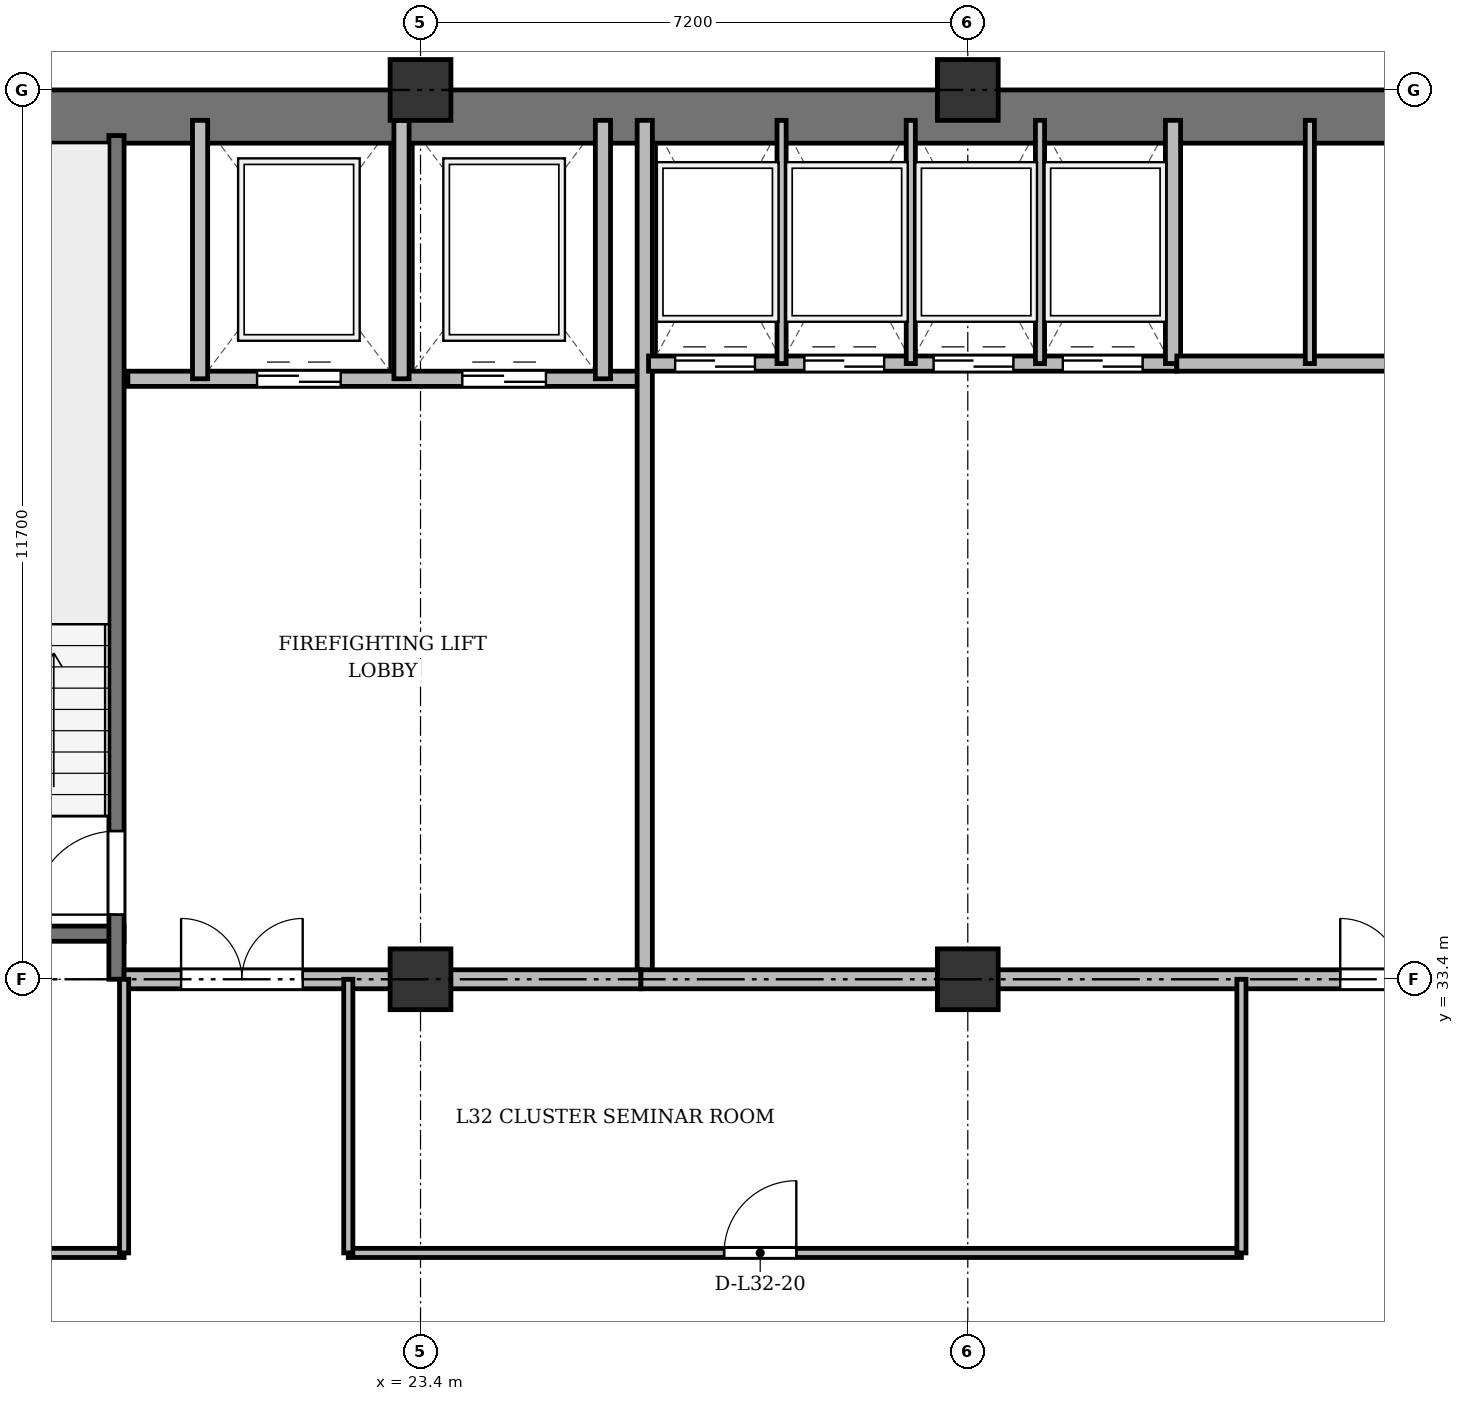
"""IFC4 building model, lengths in metres.
Left out: names, types, materials, properties, quantities, classifications, styles, units other than length and angle.
Written with IfcOpenShell. Run it as: python <this file> out.ifc"""

import sys

from ifc_helpers import new_model, si_unit, direction, frame, frame_2d, origin, origin_2d, place, context, subcontext, project, spatial, rectangle, extrude, source, transform, mapped, element, fill, save


model = new_model("IFC4")
c1 = context("Model", 3, precision=1e-05, world=origin(), true_north=direction((0.0, 1.0)))
c2 = subcontext(c1, "Body", "Model", "MODEL_VIEW")
j1 = project(units=[si_unit("LENGTHUNIT", "METRE"), si_unit("PLANEANGLEUNIT", "RADIAN")], contexts=[c1])
p1 = place(None, origin())
s1 = spatial("IfcSite", under=j1, at=p1, CompositionType="ELEMENT")
p2 = place(p1, origin())
s2 = spatial("IfcBuilding", under=s1, at=p2, CompositionType="ELEMENT")
p3 = place(p2, frame((0.0, 0.0, 124.9)))
s3 = spatial("IfcBuildingStorey", under=s2, at=p3, CompositionType="ELEMENT", Elevation=124.9)
m1 = source(origin(), c2, "Body", "SweptSolid", [
    extrude(rectangle(XDim=0.8, YDim=0.8, at=origin_2d()), origin(), (0.0, 0.0, 1.0), 3.6),
])
for number, where, z_axis, x_axis in (
    (1, (23.4, 33.4, 0.0), (0.0, 0.0, 1.0), (1.0, 0.0, 0.0)),
    (2, (23.4, 45.1, 0.0), (0.0, 0.0, 1.0), (1.0, 0.0, 0.0)),
    (3, (30.6, 33.4, 0.0), (0.0, 0.0, 1.0), (1.0, 0.0, 0.0)),
    (4, (30.6, 45.1, 0.0), (0.0, 0.0, 1.0), (1.0, 0.0, 0.0)),
):
    element("IfcColumn", number, at=place(p3, frame(where, z_axis=z_axis, x_axis=x_axis)), inside=s3, PredefinedType="COLUMN", context=c2, shape_type="MappedRepresentation", body=[
        mapped(m1, transform((0.0, 0.0, 0.0), x_axis=(1.0, 0.0, 0.0), y_axis=(0.0, 1.0, 0.0), z_axis=(0.0, 0.0, 1.0), scale=1.0)),
    ])
p4 = place(p3, frame((15.5, 44.75, 0.0), z_axis=(0.0, 0.0, 1.0), x_axis=(1.0, 0.0, 0.0)))
e5 = element("IfcWall", 5, at=p4, inside=s3, PredefinedType="SHEAR", context=c2, shape_type="SweptSolid", body=[
    extrude(rectangle(XDim=43.4, YDim=0.7, at=frame_2d((21.7, 0.0))), origin(), (0.0, 0.0, 1.0), 3.34),
])
p5 = place(p3, frame((16.1, 34.0, 0.0), z_axis=(0.0, 0.0, 1.0), x_axis=(1.0, 0.0, 0.0)))
e6 = element("IfcWall", 6, at=p5, inside=s3, PredefinedType="SHEAR", context=c2, shape_type="SweptSolid", body=[
    extrude(rectangle(XDim=3.4, YDim=0.2, at=frame_2d((1.7, 0.0))), origin(), (0.0, 0.0, 1.0), 3.34),
])
p6 = place(p3, frame((19.4, 33.4, 0.0), z_axis=(0.0, 0.0, 1.0), x_axis=(0.0, 1.0, 0.0)))
e7 = element("IfcWall", 7, at=p6, inside=s3, PredefinedType="SHEAR", context=c2, shape_type="SweptSolid", body=[
    extrude(rectangle(XDim=11.1, YDim=0.2, at=frame_2d((5.55, 0.0))), origin(), (0.0, 0.0, 1.0), 3.34),
])
p7 = place(p6, frame((0.85, 0.0, 0.0)))
e8 = element("IfcOpeningElement", 8, at=p7, cuts=e7, PredefinedType="OPENING", context=c2, shape_type="SweptSolid", body=[
    extrude(rectangle(XDim=1.1, YDim=2.15, at=frame_2d((0.55, 1.075))), frame((0.0, 0.11, 0.0), z_axis=(0.0, -1.0, 0.0), x_axis=(1.0, 0.0, 0.0)), (0.0, 0.0, 1.0), 0.22),
])
p8 = place(p3, frame((19.55, 41.3, 0.0), z_axis=(0.0, 0.0, 1.0), x_axis=(1.0, 0.0, 0.0)))
e9 = element("IfcWall", 9, at=p8, inside=s3, PredefinedType="SOLIDWALL", context=c2, shape_type="SweptSolid", body=[
    extrude(rectangle(XDim=6.75, YDim=0.2, at=frame_2d((3.375, 0.0))), origin(), (0.0, 0.0, 1.0), 3.34),
])
p9 = place(p8, frame((1.7, 0.0, 0.0)))
e10 = element("IfcOpeningElement", 10, at=p9, cuts=e9, PredefinedType="OPENING", context=c2, shape_type="SweptSolid", body=[
    extrude(rectangle(XDim=1.1, YDim=2.15, at=frame_2d((0.55, 1.075))), frame((0.0, 0.11, 0.0), z_axis=(0.0, -1.0, 0.0), x_axis=(1.0, 0.0, 0.0)), (0.0, 0.0, 1.0), 0.22),
])
p10 = place(p8, frame((4.4, 0.0, 0.0)))
e11 = element("IfcOpeningElement", 11, at=p10, cuts=e9, PredefinedType="OPENING", context=c2, shape_type="SweptSolid", body=[
    extrude(rectangle(XDim=1.1, YDim=2.15, at=frame_2d((0.55, 1.075))), frame((0.0, 0.11, 0.0), z_axis=(0.0, -1.0, 0.0), x_axis=(1.0, 0.0, 0.0)), (0.0, 0.0, 1.0), 0.22),
])
for number, where, z_axis, x_axis in (
    (12, (20.5, 41.3, 0.0), (0.0, 0.0, 1.0), (0.0, 1.0, 0.0)),
    (13, (23.15, 41.3, 0.0), (0.0, 0.0, 1.0), (0.0, 1.0, 0.0)),
    (14, (25.8, 41.3, 0.0), (0.0, 0.0, 1.0), (0.0, 1.0, 0.0)),
):
    element("IfcWall", number, at=place(p3, frame(where, z_axis=z_axis, x_axis=x_axis)), inside=s3, PredefinedType="SOLIDWALL", context=c2, shape_type="SweptSolid", body=[
        extrude(rectangle(XDim=3.4, YDim=0.2, at=frame_2d((1.7, 0.0))), origin(), (0.0, 0.0, 1.0), 3.34),
    ])
p11 = place(p3, frame((26.35, 33.4, 0.0), z_axis=(0.0, 0.0, 1.0), x_axis=(0.0, 1.0, 0.0)))
e15 = element("IfcWall", 15, at=p11, inside=s3, PredefinedType="SOLIDWALL", context=c2, shape_type="SweptSolid", body=[
    extrude(rectangle(XDim=11.3, YDim=0.2, at=frame_2d((5.65, 0.0))), origin(), (0.0, 0.0, 1.0), 2.752),
])
p12 = place(p3, frame((19.5, 33.4, 0.0), z_axis=(0.0, 0.0, 1.0), x_axis=(1.0, 0.0, 0.0)))
e16 = element("IfcWall", 16, at=p12, inside=s3, PredefinedType="PARTITIONING", context=c2, shape_type="SweptSolid", body=[
    extrude(rectangle(XDim=6.8, YDim=0.25, at=frame_2d((3.4, 0.0))), origin(), (0.0, 0.0, 1.0), 2.752),
])
p13 = place(p12, frame((0.75, 0.0, 0.0)))
e17 = element("IfcOpeningElement", 17, at=p13, cuts=e16, PredefinedType="OPENING", context=c2, shape_type="SweptSolid", body=[
    extrude(rectangle(XDim=1.6, YDim=2.2, at=frame_2d((0.8, 1.1))), frame((0.0, 0.135, 0.0), z_axis=(0.0, -1.0, 0.0), x_axis=(1.0, 0.0, 0.0)), (0.0, 0.0, 1.0), 0.27),
])
p14 = place(p3, frame((26.4, 41.5, 0.0), z_axis=(0.0, 0.0, 1.0), x_axis=(1.0, 0.0, 0.0)))
e18 = element("IfcWall", 18, at=p14, inside=s3, PredefinedType="SOLIDWALL", context=c2, shape_type="SweptSolid", body=[
    extrude(rectangle(XDim=6.95, YDim=0.2, at=frame_2d((3.475, 0.0))), origin(), (0.0, 0.0, 1.0), 3.34),
])
p15 = place(p14, frame((0.35, 0.0, 0.0)))
e19 = element("IfcOpeningElement", 19, at=p15, cuts=e18, PredefinedType="OPENING", context=c2, shape_type="SweptSolid", body=[
    extrude(rectangle(XDim=1.05, YDim=2.15, at=frame_2d((0.525, 1.075))), frame((0.0, 0.11, 0.0), z_axis=(0.0, -1.0, 0.0), x_axis=(1.0, 0.0, 0.0)), (0.0, 0.0, 1.0), 0.22),
])
p16 = place(p14, frame((2.05, 0.0, 0.0)))
e20 = element("IfcOpeningElement", 20, at=p16, cuts=e18, PredefinedType="OPENING", context=c2, shape_type="SweptSolid", body=[
    extrude(rectangle(XDim=1.05, YDim=2.15, at=frame_2d((0.525, 1.075))), frame((0.0, 0.11, 0.0), z_axis=(0.0, -1.0, 0.0), x_axis=(1.0, 0.0, 0.0)), (0.0, 0.0, 1.0), 0.22),
])
p17 = place(p14, frame((3.75, 0.0, 0.0)))
e21 = element("IfcOpeningElement", 21, at=p17, cuts=e18, PredefinedType="OPENING", context=c2, shape_type="SweptSolid", body=[
    extrude(rectangle(XDim=1.05, YDim=2.15, at=frame_2d((0.525, 1.075))), frame((0.0, 0.11, 0.0), z_axis=(0.0, -1.0, 0.0), x_axis=(1.0, 0.0, 0.0)), (0.0, 0.0, 1.0), 0.22),
])
p18 = place(p14, frame((5.45, 0.0, 0.0)))
e22 = element("IfcOpeningElement", 22, at=p18, cuts=e18, PredefinedType="OPENING", context=c2, shape_type="SweptSolid", body=[
    extrude(rectangle(XDim=1.05, YDim=2.15, at=frame_2d((0.525, 1.075))), frame((0.0, 0.11, 0.0), z_axis=(0.0, -1.0, 0.0), x_axis=(1.0, 0.0, 0.0)), (0.0, 0.0, 1.0), 0.22),
])
p19 = place(p3, frame((33.3, 41.5, 0.0), z_axis=(0.0, 0.0, 1.0), x_axis=(0.0, 1.0, 0.0)))
e23 = element("IfcWall", 23, at=p19, inside=s3, PredefinedType="SOLIDWALL", context=c2, shape_type="SweptSolid", body=[
    extrude(rectangle(XDim=3.2, YDim=0.2, at=frame_2d((1.6, 0.0))), origin(), (0.0, 0.0, 1.0), 3.34),
])
for number, where, z_axis, x_axis in (
    (24, (28.15, 41.5, 0.0), (0.0, 0.0, 1.0), (0.0, 1.0, 0.0)),
    (25, (29.85, 41.5, 0.0), (0.0, 0.0, 1.0), (0.0, 1.0, 0.0)),
    (26, (31.55, 41.5, 0.0), (0.0, 0.0, 1.0), (0.0, 1.0, 0.0)),
):
    element("IfcWall", number, at=place(p3, frame(where, z_axis=z_axis, x_axis=x_axis)), inside=s3, PredefinedType="PARTITIONING", context=c2, shape_type="SweptSolid", body=[
        extrude(rectangle(XDim=3.2, YDim=0.12, at=frame_2d((1.6, 0.0))), origin(), (0.0, 0.0, 1.0), 3.34),
    ])
p20 = place(p3, frame((33.35, 41.5, 0.0), z_axis=(0.0, 0.0, 1.0), x_axis=(1.0, 0.0, 0.0)))
e27 = element("IfcWall", 27, at=p20, inside=s3, PredefinedType="SOLIDWALL", context=c2, shape_type="SweptSolid", body=[
    extrude(rectangle(XDim=6.9, YDim=0.2, at=frame_2d((3.45, 0.0))), origin(), (0.0, 0.0, 1.0), 3.34),
])
p21 = place(p3, frame((35.1, 41.5, 0.0), z_axis=(0.0, 0.0, 1.0), x_axis=(0.0, 1.0, 0.0)))
e28 = element("IfcWall", 28, at=p21, inside=s3, PredefinedType="PARTITIONING", context=c2, shape_type="SweptSolid", body=[
    extrude(rectangle(XDim=3.2, YDim=0.12, at=frame_2d((1.6, 0.0))), origin(), (0.0, 0.0, 1.0), 3.34),
])
p22 = place(p3, frame((26.3, 33.4, 0.0), z_axis=(0.0, 0.0, 1.0), x_axis=(1.0, 0.0, 0.0)))
e29 = element("IfcWall", 29, at=p22, inside=s3, PredefinedType="PARTITIONING", context=c2, shape_type="SweptSolid", body=[
    extrude(rectangle(XDim=20.85, YDim=0.25, at=frame_2d((10.425, 0.0))), origin(), (0.0, 0.0, 1.0), 2.752),
])
p23 = place(p22, frame((9.2, 0.0, 0.0)))
e30 = element("IfcOpeningElement", 30, at=p23, cuts=e29, PredefinedType="OPENING", context=c2, shape_type="SweptSolid", body=[
    extrude(rectangle(XDim=1.6, YDim=2.2, at=frame_2d((0.8, 1.1))), frame((0.0, 0.135, 0.0), z_axis=(0.0, -1.0, 0.0), x_axis=(1.0, 0.0, 0.0)), (0.0, 0.0, 1.0), 0.27),
])
p24 = place(p3, frame((4.75, 29.8, 0.0), z_axis=(0.0, 0.0, 1.0), x_axis=(1.0, 0.0, 0.0)))
e31 = element("IfcWall", 31, at=p24, inside=s3, PredefinedType="PARTITIONING", context=c2, shape_type="SweptSolid", body=[
    extrude(rectangle(XDim=14.75, YDim=0.12, at=frame_2d((7.375, 0.0))), origin(), (0.0, 0.0, 1.0), 2.84),
])
p25 = place(p24, frame((6.9, 0.0, 0.0)))
e32 = element("IfcOpeningElement", 32, at=p25, cuts=e31, PredefinedType="OPENING", context=c2, shape_type="SweptSolid", body=[
    extrude(rectangle(XDim=0.95, YDim=2.15, at=frame_2d((0.475, 1.075))), frame((0.0, 0.07, 0.0), z_axis=(0.0, -1.0, 0.0), x_axis=(1.0, 0.0, 0.0)), (0.0, 0.0, 1.0), 0.14),
])
p26 = place(p3, frame((22.45, 29.8, 0.0), z_axis=(0.0, 0.0, 1.0), x_axis=(1.0, 0.0, 0.0)))
e33 = element("IfcWall", 33, at=p26, inside=s3, PredefinedType="PARTITIONING", context=c2, shape_type="SweptSolid", body=[
    extrude(rectangle(XDim=11.75, YDim=0.12, at=frame_2d((5.875, 0.0))), origin(), (0.0, 0.0, 1.0), 2.84),
])
p27 = place(p26, frame((4.944, 0.0, 0.0)))
e34 = element("IfcOpeningElement", 34, at=p27, cuts=e33, PredefinedType="OPENING", context=c2, shape_type="SweptSolid", body=[
    extrude(rectangle(XDim=0.95, YDim=2.15, at=frame_2d((0.475, 1.075))), frame((0.0, 0.07, 0.0), z_axis=(0.0, -1.0, 0.0), x_axis=(1.0, 0.0, 0.0)), (0.0, 0.0, 1.0), 0.14),
])
for number, where, z_axis, x_axis in (
    (35, (19.5, 29.8, 0.0), (0.0, 0.0, 1.0), (0.0, 1.0, 0.0)),
    (36, (22.45, 29.8, 0.0), (0.0, 0.0, 1.0), (0.0, 1.0, 0.0)),
    (37, (34.2, 29.8, 0.0), (0.0, 0.0, 1.0), (0.0, 1.0, 0.0)),
):
    element("IfcWall", number, at=place(p3, frame(where, z_axis=z_axis, x_axis=x_axis)), inside=s3, PredefinedType="PARTITIONING", context=c2, shape_type="SweptSolid", body=[
        extrude(rectangle(XDim=3.6, YDim=0.12, at=frame_2d((1.8, 0.0))), origin(), (0.0, 0.0, 1.0), 2.752),
    ])
m2 = source(origin(), c2, "Body", "SweptSolid", [
    extrude(rectangle(XDim=1.1, YDim=2.15, at=frame_2d((0.55, 1.075))), frame((0.0, 0.025, 0.0), z_axis=(0.0, -1.0, 0.0), x_axis=(1.0, 0.0, 0.0)), (0.0, 0.0, 1.0), 0.05),
])
p28 = place(p7, origin())
e38 = element("IfcDoor", 38, at=p28, inside=s3, OperationType="SINGLE_SWING_LEFT", PredefinedType="DOOR", context=c2, shape_type="MappedRepresentation", body=[
    mapped(m2, transform((0.0, 0.0, 0.0), x_axis=(1.0, 0.0, 0.0), y_axis=(0.0, 1.0, 0.0), z_axis=(0.0, 0.0, 1.0), scale=1.0)),
])
fill(e8, e38)
p29 = place(p9, origin())
e39 = element("IfcDoor", 39, at=p29, inside=s3, OperationType="DOUBLE_DOOR_SLIDING", PredefinedType="DOOR", context=c2, shape_type="MappedRepresentation", body=[
    mapped(m2, transform((0.0, 0.0, 0.0), x_axis=(1.0, 0.0, 0.0), y_axis=(0.0, 1.0, 0.0), z_axis=(0.0, 0.0, 1.0), scale=1.0)),
])
fill(e10, e39)
p30 = place(p10, origin())
e40 = element("IfcDoor", 40, at=p30, inside=s3, OperationType="DOUBLE_DOOR_SLIDING", PredefinedType="DOOR", context=c2, shape_type="MappedRepresentation", body=[
    mapped(m2, transform((0.0, 0.0, 0.0), x_axis=(1.0, 0.0, 0.0), y_axis=(0.0, 1.0, 0.0), z_axis=(0.0, 0.0, 1.0), scale=1.0)),
])
fill(e11, e40)
m3 = source(origin(), c2, "Body", "SweptSolid", [
    extrude(rectangle(XDim=1.6, YDim=2.2, at=frame_2d((0.8, 1.1))), frame((0.0, 0.025, 0.0), z_axis=(0.0, -1.0, 0.0), x_axis=(1.0, 0.0, 0.0)), (0.0, 0.0, 1.0), 0.05),
])
p31 = place(p13, origin())
e41 = element("IfcDoor", 41, at=p31, inside=s3, OperationType="DOUBLE_DOOR_SINGLE_SWING", PredefinedType="DOOR", context=c2, shape_type="MappedRepresentation", body=[
    mapped(m3, transform((0.0, 0.0, 0.0), x_axis=(1.0, 0.0, 0.0), y_axis=(0.0, 1.0, 0.0), z_axis=(0.0, 0.0, 1.0), scale=1.0)),
])
fill(e17, e41)
m4 = source(origin(), c2, "Body", "SweptSolid", [
    extrude(rectangle(XDim=1.05, YDim=2.15, at=frame_2d((0.525, 1.075))), frame((0.0, 0.025, 0.0), z_axis=(0.0, -1.0, 0.0), x_axis=(1.0, 0.0, 0.0)), (0.0, 0.0, 1.0), 0.05),
])
p32 = place(p15, origin())
e42 = element("IfcDoor", 42, at=p32, inside=s3, OperationType="DOUBLE_DOOR_SLIDING", PredefinedType="DOOR", context=c2, shape_type="MappedRepresentation", body=[
    mapped(m4, transform((0.0, 0.0, 0.0), x_axis=(1.0, 0.0, 0.0), y_axis=(0.0, 1.0, 0.0), z_axis=(0.0, 0.0, 1.0), scale=1.0)),
])
fill(e19, e42)
p33 = place(p16, origin())
e43 = element("IfcDoor", 43, at=p33, inside=s3, OperationType="DOUBLE_DOOR_SLIDING", PredefinedType="DOOR", context=c2, shape_type="MappedRepresentation", body=[
    mapped(m4, transform((0.0, 0.0, 0.0), x_axis=(1.0, 0.0, 0.0), y_axis=(0.0, 1.0, 0.0), z_axis=(0.0, 0.0, 1.0), scale=1.0)),
])
fill(e20, e43)
p34 = place(p17, origin())
e44 = element("IfcDoor", 44, at=p34, inside=s3, OperationType="DOUBLE_DOOR_SLIDING", PredefinedType="DOOR", context=c2, shape_type="MappedRepresentation", body=[
    mapped(m4, transform((0.0, 0.0, 0.0), x_axis=(1.0, 0.0, 0.0), y_axis=(0.0, 1.0, 0.0), z_axis=(0.0, 0.0, 1.0), scale=1.0)),
])
fill(e21, e44)
p35 = place(p18, origin())
e45 = element("IfcDoor", 45, at=p35, inside=s3, OperationType="DOUBLE_DOOR_SLIDING", PredefinedType="DOOR", context=c2, shape_type="MappedRepresentation", body=[
    mapped(m4, transform((0.0, 0.0, 0.0), x_axis=(1.0, 0.0, 0.0), y_axis=(0.0, 1.0, 0.0), z_axis=(0.0, 0.0, 1.0), scale=1.0)),
])
fill(e22, e45)
p36 = place(p23, origin())
e46 = element("IfcDoor", 46, at=p36, inside=s3, OperationType="DOUBLE_DOOR_SINGLE_SWING", PredefinedType="DOOR", context=c2, shape_type="MappedRepresentation", body=[
    mapped(m3, transform((0.0, 0.0, 0.0), x_axis=(1.0, 0.0, 0.0), y_axis=(0.0, 1.0, 0.0), z_axis=(0.0, 0.0, 1.0), scale=1.0)),
])
fill(e30, e46)
m5 = source(origin(), c2, "Body", "SweptSolid", [
    extrude(rectangle(XDim=0.95, YDim=2.15, at=frame_2d((0.475, 1.075))), frame((0.0, 0.025, 0.0), z_axis=(0.0, -1.0, 0.0), x_axis=(1.0, 0.0, 0.0)), (0.0, 0.0, 1.0), 0.05),
])
p37 = place(p27, origin())
e47 = element("IfcDoor", 47, at=p37, inside=s3, OperationType="SINGLE_SWING_RIGHT", PredefinedType="DOOR", context=c2, shape_type="MappedRepresentation", body=[
    mapped(m5, transform((0.0, 0.0, 0.0), x_axis=(1.0, 0.0, 0.0), y_axis=(0.0, 1.0, 0.0), z_axis=(0.0, 0.0, 1.0), scale=1.0)),
])
fill(e34, e47)
save(model, sys.argv[1])
